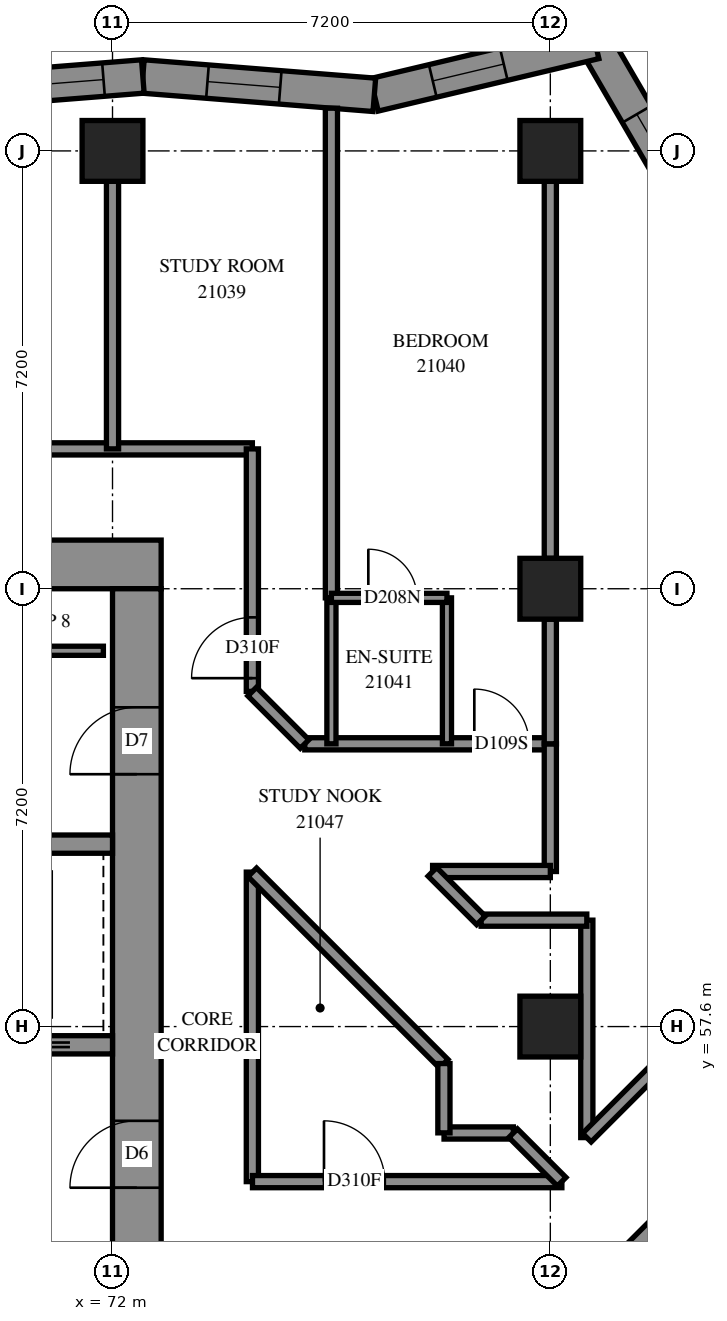
"""IFC4 building model, lengths in metres.
Left out: names, types, materials, properties, quantities, classifications, styles, units other than length and angle.
Written with IfcOpenShell. Run it as: python <this file> out.ifc"""

import sys

from ifc_helpers import new_model, si_unit, direction, frame, frame_2d, origin, origin_2d, place, context, subcontext, project, spatial, polyline, rectangle, outline, extrude, element, fill, save


model = new_model("IFC4")
c1 = context("Model", 3, precision=1e-05, world=origin(), true_north=direction((0.0, 1.0)))
c2 = subcontext(c1, "Body", "Model", "MODEL_VIEW")
j1 = project(units=[si_unit("LENGTHUNIT", "METRE"), si_unit("PLANEANGLEUNIT", "RADIAN")], contexts=[c1])
p1 = place(None, origin())
s1 = spatial("IfcSite", under=j1, at=p1, CompositionType="ELEMENT")
p2 = place(p1, origin())
s2 = spatial("IfcBuilding", under=s1, at=p2, CompositionType="ELEMENT")
p3 = place(p2, frame((0.0, 0.0, 81.2)))
s3 = spatial("IfcBuildingStorey", under=s2, at=p3, CompositionType="ELEMENT", Elevation=81.2)
for number, where, z_axis, x_axis in (
    (1, (72.0, 72.0, 0.0), (0.0, 0.0, 1.0), (1.0, 0.0, 0.0)),
    (2, (79.2, 57.6, 0.0), (0.0, 0.0, 1.0), (1.0, 0.0, 0.0)),
    (3, (79.2, 64.8, 0.0), (0.0, 0.0, 1.0), (1.0, 0.0, 0.0)),
    (4, (79.2, 72.0, 0.0), (0.0, 0.0, 1.0), (1.0, 0.0, 0.0)),
):
    element("IfcColumn", number, at=place(p3, frame(where, z_axis=z_axis, x_axis=x_axis)), inside=s3, PredefinedType="COLUMN", context=c2, shape_type="SweptSolid", body=[
        extrude(rectangle(XDim=1.0, YDim=1.0, at=origin_2d()), origin(), (0.0, 0.0, 1.0), 3.1),
    ])
p4 = place(p3, frame((56.8, 65.2, -0.3), z_axis=(0.0, 0.0, 1.0), x_axis=(1.0, 0.0, 0.0)))
e5 = element("IfcWall", 5, at=p4, inside=s3, PredefinedType="SHEAR", context=c2, shape_type="SweptSolid", body=[
    extrude(rectangle(XDim=16.0, YDim=0.8, at=frame_2d((8.0, 0.0))), origin(), (0.0, 0.0, 1.0), 2.7),
])
p5 = place(p4, frame((10.8, 0.0, 0.3)))
e6 = element("IfcOpeningElement", 6, at=p5, cuts=e5, PredefinedType="OPENING", context=c2, shape_type="SweptSolid", body=[
    extrude(rectangle(XDim=0.8, YDim=2.1, at=frame_2d((0.4, 1.05))), frame((0.0, 0.41, 0.0), z_axis=(0.0, -1.0, 0.0), x_axis=(1.0, 0.0, 0.0)), (0.0, 0.0, 1.0), 0.82),
])
p6 = place(p3, frame((72.4, 50.4, -0.3), z_axis=(0.0, 0.0, 1.0), x_axis=(0.0, 1.0, 0.0)))
e7 = element("IfcWall", 7, at=p6, inside=s3, PredefinedType="SHEAR", context=c2, shape_type="SweptSolid", body=[
    extrude(rectangle(XDim=14.4, YDim=0.8, at=frame_2d((7.2, 0.0))), origin(), (0.0, 0.0, 1.0), 2.7),
])
p7 = place(p6, frame((4.55, 0.0, 0.3)))
e8 = element("IfcOpeningElement", 8, at=p7, cuts=e7, PredefinedType="OPENING", context=c2, shape_type="SweptSolid", body=[
    extrude(rectangle(XDim=1.1, YDim=2.1, at=frame_2d((0.55, 1.05))), frame((0.0, 0.41, 0.0), z_axis=(0.0, -1.0, 0.0), x_axis=(1.0, 0.0, 0.0)), (0.0, 0.0, 1.0), 0.82),
])
p8 = place(p6, frame((11.35, 0.0, 0.3)))
e9 = element("IfcOpeningElement", 9, at=p8, cuts=e7, PredefinedType="OPENING", context=c2, shape_type="SweptSolid", body=[
    extrude(rectangle(XDim=1.1, YDim=2.1, at=frame_2d((0.55, 1.05))), frame((0.0, 0.41, 0.0), z_axis=(0.0, -1.0, 0.0), x_axis=(1.0, 0.0, 0.0)), (0.0, 0.0, 1.0), 0.82),
])
p9 = place(p3, frame((57.6, 57.3, 0.0), z_axis=(0.0, 0.0, 1.0), x_axis=(1.0, 0.0, 0.0)))
e10 = element("IfcWall", 10, at=p9, inside=s3, PredefinedType="SOLIDWALL", context=c2, shape_type="SweptSolid", body=[
    extrude(rectangle(XDim=14.4, YDim=0.3, at=frame_2d((7.2, 0.0))), origin(), (0.0, 0.0, 1.0), 3.1),
])
p10 = place(p9, frame((12.05, 0.0, 0.0)))
e11 = element("IfcOpeningElement", 11, at=p10, cuts=e10, PredefinedType="OPENING", context=c2, shape_type="SweptSolid", body=[
    extrude(rectangle(XDim=1.1, YDim=2.1, at=frame_2d((0.55, 1.05))), frame((0.0, 0.16, 0.0), z_axis=(0.0, -1.0, 0.0), x_axis=(1.0, 0.0, 0.0)), (0.0, 0.0, 1.0), 0.32),
])
p11 = place(p3, frame((64.8, 60.6, 0.0), z_axis=(0.0, 0.0, 1.0), x_axis=(1.0, 0.0, 0.0)))
e12 = element("IfcWall", 12, at=p11, inside=s3, PredefinedType="SOLIDWALL", context=c2, shape_type="SweptSolid", body=[
    extrude(rectangle(XDim=7.2, YDim=0.3, at=frame_2d((3.6, 0.0))), origin(), (0.0, 0.0, 1.0), 3.1),
])
p12 = place(p3, frame((76.372, 49.373, -0.3), z_axis=(0.0, 0.0, 1.0), x_axis=(0.7071067812, 0.7071067812, 0.0)))
e13 = element("IfcWall", 13, at=p12, inside=s3, PredefinedType="SHEAR", context=c2, shape_type="SweptSolid", body=[
    extrude(rectangle(XDim=14.4, YDim=0.8, at=frame_2d((7.2, 0.0))), origin(), (0.0, 0.0, 1.0), 2.7),
])
p13 = place(p12, frame((4.55, 0.0, 0.3)))
e14 = element("IfcOpeningElement", 14, at=p13, cuts=e13, PredefinedType="OPENING", context=c2, shape_type="SweptSolid", body=[
    extrude(rectangle(XDim=1.1, YDim=2.1, at=frame_2d((0.55, 1.05))), frame((0.0, 0.41, 0.0), z_axis=(0.0, -1.0, 0.0), x_axis=(1.0, 0.0, 0.0)), (0.0, 0.0, 1.0), 0.82),
])
p14 = place(p12, frame((11.35, 0.0, 0.3)))
e15 = element("IfcOpeningElement", 15, at=p14, cuts=e13, PredefinedType="OPENING", context=c2, shape_type="SweptSolid", body=[
    extrude(rectangle(XDim=1.1, YDim=2.1, at=frame_2d((0.55, 1.05))), frame((0.0, 0.41, 0.0), z_axis=(0.0, -1.0, 0.0), x_axis=(1.0, 0.0, 0.0)), (0.0, 0.0, 1.0), 0.82),
])
p15 = place(p3, frame((81.628, 70.876, 0.0), z_axis=(0.0, 0.0, 1.0), x_axis=(-0.5029323205, 0.8643257956, 0.0)))
e16 = element("IfcWall", 16, at=p15, inside=s3, PredefinedType="SOLIDWALL", context=c2, shape_type="SweptSolid", body=[
    extrude(outline(polyline([(0.048, -0.275), (3.57, -0.275), (3.162, 0.275), (-0.048, 0.275), (0.048, -0.275)])), origin(), (0.0, 0.0, 1.0), 3.1),
])
p16 = place(p15, frame((0.799, 0.0, 0.5)))
e17 = element("IfcOpeningElement", 17, at=p16, cuts=e16, PredefinedType="OPENING", context=c2, shape_type="SweptSolid", body=[
    extrude(rectangle(XDim=1.2, YDim=2.45, at=frame_2d((0.6, 1.225))), frame((0.0, 0.285, 0.0), z_axis=(0.0, -1.0, 0.0), x_axis=(1.0, 0.0, 0.0)), (0.0, 0.0, 1.0), 0.57),
])
p17 = place(p3, frame((79.935, 73.785, 0.0), z_axis=(0.0, 0.0, 1.0), x_axis=(-0.9728843946, -0.2312919254, 0.0)))
e18 = element("IfcWall", 18, at=p17, inside=s3, PredefinedType="SOLIDWALL", context=c2, shape_type="SweptSolid", body=[
    extrude(outline(polyline([(-0.204, -0.275), (3.687, -0.275), (3.774, 0.275), (0.204, 0.275), (-0.204, -0.275)])), origin(), (0.0, 0.0, 1.0), 3.1),
])
p18 = place(p17, frame((1.543, 0.0, 0.5)))
e19 = element("IfcOpeningElement", 19, at=p18, cuts=e18, PredefinedType="OPENING", context=c2, shape_type="SweptSolid", body=[
    extrude(rectangle(XDim=1.2, YDim=2.45, at=frame_2d((0.6, 1.225))), frame((0.0, 0.285, 0.0), z_axis=(0.0, -1.0, 0.0), x_axis=(1.0, 0.0, 0.0)), (0.0, 0.0, 1.0), 0.57),
])
p19 = place(p3, frame((76.306, 72.922, 0.0), z_axis=(0.0, 0.0, 1.0), x_axis=(-0.9968745318, 0.0790010628, 0.0)))
e20 = element("IfcWall", 20, at=p19, inside=s3, PredefinedType="SOLIDWALL", context=c2, shape_type="SweptSolid", body=[
    extrude(outline(polyline([(0.043, -0.275), (3.841, -0.275), (3.797, 0.275), (-0.043, 0.275), (0.043, -0.275)])), origin(), (0.0, 0.0, 1.0), 3.1),
])
p20 = place(p19, frame((1.553, 0.0, 0.5)))
e21 = element("IfcOpeningElement", 21, at=p20, cuts=e20, PredefinedType="OPENING", context=c2, shape_type="SweptSolid", body=[
    extrude(rectangle(XDim=1.2, YDim=2.45, at=frame_2d((0.6, 1.225))), frame((0.0, 0.285, 0.0), z_axis=(0.0, -1.0, 0.0), x_axis=(1.0, 0.0, 0.0)), (0.0, 0.0, 1.0), 0.57),
])
p21 = place(p3, frame((72.499, 73.224, 0.0), z_axis=(0.0, 0.0, 1.0), x_axis=(-0.9968747806, -0.0789979222, 0.0)))
e22 = element("IfcWall", 22, at=p21, inside=s3, PredefinedType="SOLIDWALL", context=c2, shape_type="SweptSolid", body=[
    extrude(outline(polyline([(-0.022, -0.275), (3.776, -0.275), (3.819, 0.275), (0.022, 0.275), (-0.022, -0.275)])), origin(), (0.0, 0.0, 1.0), 3.1),
])
p22 = place(p21, frame((0.649, 0.0, 0.5)))
e23 = element("IfcOpeningElement", 23, at=p22, cuts=e22, PredefinedType="OPENING", context=c2, shape_type="SweptSolid", body=[
    extrude(rectangle(XDim=1.3, YDim=2.45, at=frame_2d((0.65, 1.225))), frame((0.0, 0.285, 0.0), z_axis=(0.0, -1.0, 0.0), x_axis=(1.0, 0.0, 0.0)), (0.0, 0.0, 1.0), 0.57),
])
p23 = place(p21, frame((2.149, 0.0, 0.5)))
e24 = element("IfcOpeningElement", 24, at=p23, cuts=e22, PredefinedType="OPENING", context=c2, shape_type="SweptSolid", body=[
    extrude(rectangle(XDim=1.3, YDim=2.45, at=frame_2d((0.65, 1.225))), frame((0.0, 0.285, 0.0), z_axis=(0.0, -1.0, 0.0), x_axis=(1.0, 0.0, 0.0)), (0.0, 0.0, 1.0), 0.57),
])
p24 = place(p3, frame((64.95, 63.78, 0.0), z_axis=(0.0, 0.0, 1.0), x_axis=(1.0, 0.0, 0.0)))
e25 = element("IfcWall", 25, at=p24, inside=s3, PredefinedType="PARTITIONING", context=c2, shape_type="SweptSolid", body=[
    extrude(rectangle(XDim=6.9, YDim=0.15, at=frame_2d((3.45, 0.0))), origin(), (0.0, 0.0, 1.0), 3.1),
])
p25 = place(p3, frame((55.3, 67.1, 0.0), z_axis=(0.0, 0.0, 1.0), x_axis=(1.0, 0.0, 0.0)))
e26 = element("IfcWall", 26, at=p25, inside=s3, PredefinedType="PARTITIONING", context=c2, shape_type="SweptSolid", body=[
    extrude(rectangle(XDim=19.0, YDim=0.2, at=frame_2d((9.5, 0.0))), origin(), (0.0, 0.0, 1.0), 3.1),
])
p26 = place(p25, frame((6.161, 0.0, 0.0)))
e27 = element("IfcOpeningElement", 27, at=p26, cuts=e26, PredefinedType="OPENING", context=c2, shape_type="SweptSolid", body=[
    extrude(rectangle(XDim=0.9, YDim=2.1, at=frame_2d((0.45, 1.05))), frame((0.0, 0.11, 0.0), z_axis=(0.0, -1.0, 0.0), x_axis=(1.0, 0.0, 0.0)), (0.0, 0.0, 1.0), 0.22),
])
p27 = place(p25, frame((13.386, 0.0, 0.0)))
e28 = element("IfcOpeningElement", 28, at=p27, cuts=e26, PredefinedType="OPENING", context=c2, shape_type="SweptSolid", body=[
    extrude(rectangle(XDim=1.0, YDim=2.1, at=frame_2d((0.5, 1.05))), frame((0.0, 0.11, 0.0), z_axis=(0.0, -1.0, 0.0), x_axis=(1.0, 0.0, 0.0)), (0.0, 0.0, 1.0), 0.22),
])
p28 = place(p3, frame((75.6, 64.65, 0.0), z_axis=(0.0, 0.0, 1.0), x_axis=(0.0, 1.0, 0.0)))
e29 = element("IfcWall", 29, at=p28, inside=s3, PredefinedType="PARTITIONING", context=c2, shape_type="SweptSolid", body=[
    extrude(rectangle(XDim=8.053, YDim=0.2, at=frame_2d((4.026, 0.0))), origin(), (0.0, 0.0, 1.0), 3.1),
])
p29 = place(p3, frame((79.2, 65.3, 0.0), z_axis=(0.0, 0.0, 1.0), x_axis=(0.0, 1.0, 0.0)))
e30 = element("IfcWall", 30, at=p29, inside=s3, PredefinedType="PARTITIONING", context=c2, shape_type="SweptSolid", body=[
    extrude(rectangle(XDim=6.2, YDim=0.2, at=frame_2d((3.1, 0.0))), origin(), (0.0, 0.0, 1.0), 3.1),
])
p30 = place(p3, frame((74.3, 55.05, 0.0), z_axis=(0.0, 0.0, 1.0), x_axis=(0.0, 1.0, 0.0)))
e31 = element("IfcWall", 31, at=p30, inside=s3, PredefinedType="PARTITIONING", context=c2, shape_type="SweptSolid", body=[
    extrude(rectangle(XDim=5.09, YDim=0.2, at=frame_2d((2.545, 0.0))), origin(), (0.0, 0.0, 1.0), 3.1),
])
p31 = place(p3, frame((74.302, 55.05, 0.0), z_axis=(0.0, 0.0, 1.0), x_axis=(1.0, 0.0, 0.0)))
e32 = element("IfcWall", 32, at=p31, inside=s3, PredefinedType="PARTITIONING", context=c2, shape_type="SweptSolid", body=[
    extrude(rectangle(XDim=5.088, YDim=0.2, at=frame_2d((2.544, 0.0))), origin(), (0.0, 0.0, 1.0), 3.1),
])
p32 = place(p31, frame((1.176, 0.0, 0.0)))
e33 = element("IfcOpeningElement", 33, at=p32, cuts=e32, PredefinedType="OPENING", context=c2, shape_type="SweptSolid", body=[
    extrude(rectangle(XDim=1.0, YDim=2.1, at=frame_2d((0.5, 1.05))), frame((0.0, 0.11, 0.0), z_axis=(0.0, -1.0, 0.0), x_axis=(1.0, 0.0, 0.0)), (0.0, 0.0, 1.0), 0.22),
])
p33 = place(p3, frame((74.299, 60.137, 0.0), z_axis=(0.0, 0.0, 1.0), x_axis=(0.7071067812, -0.7071067812, 0.0)))
e34 = element("IfcWall", 34, at=p33, inside=s3, PredefinedType="PARTITIONING", context=c2, shape_type="SweptSolid", body=[
    extrude(rectangle(XDim=4.452, YDim=0.2, at=frame_2d((2.226, 0.0))), origin(), (0.0, 0.0, 1.0), 3.1),
])
p34 = place(p3, frame((72.0, 67.1, 0.0), z_axis=(0.0, 0.0, 1.0), x_axis=(0.0, 1.0, 0.0)))
e35 = element("IfcWall", 35, at=p34, inside=s3, PredefinedType="PARTITIONING", context=c2, shape_type="SweptSolid", body=[
    extrude(rectangle(XDim=4.4, YDim=0.2, at=frame_2d((2.2, 0.0))), origin(), (0.0, 0.0, 1.0), 3.1),
])
p35 = place(p3, frame((75.162, 62.25, 0.0), z_axis=(0.0, 0.0, 1.0), x_axis=(1.0, 0.0, 0.0)))
e36 = element("IfcWall", 36, at=p35, inside=s3, PredefinedType="PARTITIONING", context=c2, shape_type="SweptSolid", body=[
    extrude(rectangle(XDim=4.038, YDim=0.2, at=frame_2d((2.019, 0.0))), origin(), (0.0, 0.0, 1.0), 3.1),
])
p36 = place(p35, frame((2.788, 0.0, 0.0)))
e37 = element("IfcOpeningElement", 37, at=p36, cuts=e36, PredefinedType="OPENING", context=c2, shape_type="SweptSolid", body=[
    extrude(rectangle(XDim=0.9, YDim=2.1, at=frame_2d((0.45, 1.05))), frame((0.0, 0.11, 0.0), z_axis=(0.0, -1.0, 0.0), x_axis=(1.0, 0.0, 0.0)), (0.0, 0.0, 1.0), 0.22),
])
p37 = place(p3, frame((74.3, 63.112, 0.0), z_axis=(0.0, 0.0, 1.0), x_axis=(0.0, 1.0, 0.0)))
e38 = element("IfcWall", 38, at=p37, inside=s3, PredefinedType="PARTITIONING", context=c2, shape_type="SweptSolid", body=[
    extrude(rectangle(XDim=3.988, YDim=0.2, at=frame_2d((1.994, 0.0))), origin(), (0.0, 0.0, 1.0), 3.1),
])
p38 = place(p37, frame((0.217, 0.0, 0.0)))
e39 = element("IfcOpeningElement", 39, at=p38, cuts=e38, PredefinedType="OPENING", context=c2, shape_type="SweptSolid", body=[
    extrude(rectangle(XDim=1.0, YDim=2.1, at=frame_2d((0.5, 1.05))), frame((0.0, 0.11, 0.0), z_axis=(0.0, -1.0, 0.0), x_axis=(1.0, 0.0, 0.0)), (0.0, 0.0, 1.0), 0.22),
])
p39 = place(p3, frame((79.8, 55.774, 0.0), z_axis=(0.0, 0.0, 1.0), x_axis=(0.0, 1.0, 0.0)))
e40 = element("IfcWall", 40, at=p39, inside=s3, PredefinedType="PARTITIONING", context=c2, shape_type="SweptSolid", body=[
    extrude(rectangle(XDim=3.576, YDim=0.2, at=frame_2d((1.788, 0.0))), origin(), (0.0, 0.0, 1.0), 3.1),
])
for number, where, z_axis, x_axis in (
    (41, (75.6, 62.25, 0.0), (0.0, 0.0, 1.0), (0.0, 1.0, 0.0)),
    (42, (77.5, 62.25, 0.0), (0.0, 0.0, 1.0), (0.0, 1.0, 0.0)),
):
    element("IfcWall", number, at=place(p3, frame(where, z_axis=z_axis, x_axis=x_axis)), inside=s3, PredefinedType="PARTITIONING", context=c2, shape_type="SweptSolid", body=[
        extrude(rectangle(XDim=2.4, YDim=0.15, at=frame_2d((1.2, 0.0))), origin(), (0.0, 0.0, 1.0), 3.1),
    ])
p40 = place(p3, frame((79.2, 60.15, 0.0), z_axis=(0.0, 0.0, 1.0), x_axis=(0.0, 1.0, 0.0)))
e43 = element("IfcWall", 43, at=p40, inside=s3, PredefinedType="PARTITIONING", context=c2, shape_type="SweptSolid", body=[
    extrude(rectangle(XDim=2.1, YDim=0.2, at=frame_2d((1.05, 0.0))), origin(), (0.0, 0.0, 1.0), 3.1),
])
p41 = place(p3, frame((79.2, 62.25, 0.0), z_axis=(0.0, 0.0, 1.0), x_axis=(0.0, 1.0, 0.0)))
e44 = element("IfcWall", 44, at=p41, inside=s3, PredefinedType="PARTITIONING", context=c2, shape_type="SweptSolid", body=[
    extrude(rectangle(XDim=2.05, YDim=0.2, at=frame_2d((1.025, 0.0))), origin(), (0.0, 0.0, 1.0), 3.1),
])
p42 = place(p3, frame((77.264, 60.15, 0.0), z_axis=(0.0, 0.0, 1.0), x_axis=(1.0, 0.0, 0.0)))
e45 = element("IfcWall", 45, at=p42, inside=s3, PredefinedType="PARTITIONING", context=c2, shape_type="SweptSolid", body=[
    extrude(rectangle(XDim=1.936, YDim=0.2, at=frame_2d((0.968, 0.0))), origin(), (0.0, 0.0, 1.0), 3.1),
])
p43 = place(p3, frame((75.6, 64.65, 0.0), z_axis=(0.0, 0.0, 1.0), x_axis=(1.0, 0.0, 0.0)))
e46 = element("IfcWall", 46, at=p43, inside=s3, PredefinedType="PARTITIONING", context=c2, shape_type="SweptSolid", body=[
    extrude(rectangle(XDim=1.9, YDim=0.15, at=frame_2d((0.95, 0.0))), origin(), (0.0, 0.0, 1.0), 3.1),
])
p44 = place(p43, frame((0.607, 0.0, 0.0)))
e47 = element("IfcOpeningElement", 47, at=p44, cuts=e46, PredefinedType="OPENING", context=c2, shape_type="SweptSolid", body=[
    extrude(rectangle(XDim=0.8, YDim=2.1, at=frame_2d((0.4, 1.05))), frame((0.0, 0.085, 0.0), z_axis=(0.0, -1.0, 0.0), x_axis=(1.0, 0.0, 0.0)), (0.0, 0.0, 1.0), 0.17),
])
p45 = place(p3, frame((78.062, 59.35, 0.0), z_axis=(0.0, 0.0, 1.0), x_axis=(1.0, 0.0, 0.0)))
e48 = element("IfcWall", 48, at=p45, inside=s3, PredefinedType="PARTITIONING", context=c2, shape_type="SweptSolid", body=[
    extrude(rectangle(XDim=1.738, YDim=0.2, at=frame_2d((0.869, 0.0))), origin(), (0.0, 0.0, 1.0), 3.1),
])
p46 = place(p3, frame((79.801, 55.773, 0.0), z_axis=(0.0, 0.0, 1.0), x_axis=(0.7071067812, 0.7071067812, 0.0)))
e49 = element("IfcWall", 49, at=p46, inside=s3, PredefinedType="PARTITIONING", context=c2, shape_type="SweptSolid", body=[
    extrude(rectangle(XDim=1.623, YDim=0.2, at=frame_2d((0.812, 0.0))), origin(), (0.0, 0.0, 1.0), 3.1),
])
p47 = place(p3, frame((74.296, 63.108, 0.0), z_axis=(0.0, 0.0, 1.0), x_axis=(0.7071067812, -0.7071067812, 0.0)))
e50 = element("IfcWall", 50, at=p47, inside=s3, PredefinedType="PARTITIONING", context=c2, shape_type="SweptSolid", body=[
    extrude(rectangle(XDim=1.219, YDim=0.2, at=frame_2d((0.61, 0.0))), origin(), (0.0, 0.0, 1.0), 3.1),
])
for number, where, z_axis, x_axis in (
    (51, (77.452, 55.85, 0.0), (0.0, 0.0, 1.0), (1.0, 0.0, 0.0)),
    (52, (77.45, 55.852, 0.0), (0.0, 0.0, 1.0), (0.0, 1.0, 0.0)),
):
    element("IfcWall", number, at=place(p3, frame(where, z_axis=z_axis, x_axis=x_axis)), inside=s3, PredefinedType="PARTITIONING", context=c2, shape_type="SweptSolid", body=[
        extrude(rectangle(XDim=1.14, YDim=0.2, at=frame_2d((0.57, 0.0))), origin(), (0.0, 0.0, 1.0), 3.1),
    ])
for number, where, z_axis, x_axis in (
    (53, (77.26, 60.145, 0.0), (0.0, 0.0, 1.0), (0.707, -0.707, 0.0)),
    (54, (78.589, 55.847, 0.0), (0.0, 0.0, 1.0), (0.707, -0.707, 0.0)),
):
    element("IfcWall", number, at=place(p3, frame(where, z_axis=z_axis, x_axis=x_axis)), inside=s3, PredefinedType="PARTITIONING", context=c2, shape_type="SweptSolid", body=[
        extrude(rectangle(XDim=1.129, YDim=0.2, at=frame_2d((0.564, 0.0))), origin(), (0.0, 0.0, 1.0), 3.1),
    ])
p48 = place(p16, origin())
e55 = element("IfcWindow", 55, at=p48, inside=s3, PartitioningType="SINGLE_PANEL", PredefinedType="WINDOW", context=c2, shape_type="SweptSolid", body=[
    extrude(rectangle(XDim=1.2, YDim=2.45, at=frame_2d((0.6, 1.225))), frame((0.0, 0.155, 0.0), z_axis=(0.0, -1.0, 0.0), x_axis=(1.0, 0.0, 0.0)), (0.0, 0.0, 1.0), 0.06),
])
fill(e17, e55)
p49 = place(p18, origin())
e56 = element("IfcWindow", 56, at=p49, inside=s3, PartitioningType="SINGLE_PANEL", PredefinedType="WINDOW", context=c2, shape_type="SweptSolid", body=[
    extrude(rectangle(XDim=1.2, YDim=2.45, at=frame_2d((0.6, 1.225))), frame((0.0, 0.155, 0.0), z_axis=(0.0, -1.0, 0.0), x_axis=(1.0, 0.0, 0.0)), (0.0, 0.0, 1.0), 0.06),
])
fill(e19, e56)
p50 = place(p20, origin())
e57 = element("IfcWindow", 57, at=p50, inside=s3, PartitioningType="SINGLE_PANEL", PredefinedType="WINDOW", context=c2, shape_type="SweptSolid", body=[
    extrude(rectangle(XDim=1.2, YDim=2.45, at=frame_2d((0.6, 1.225))), frame((0.0, 0.155, 0.0), z_axis=(0.0, -1.0, 0.0), x_axis=(1.0, 0.0, 0.0)), (0.0, 0.0, 1.0), 0.06),
])
fill(e21, e57)
p51 = place(p22, origin())
e58 = element("IfcWindow", 58, at=p51, inside=s3, PartitioningType="SINGLE_PANEL", PredefinedType="WINDOW", context=c2, shape_type="SweptSolid", body=[
    extrude(rectangle(XDim=1.3, YDim=2.45, at=frame_2d((0.65, 1.225))), frame((0.0, 0.155, 0.0), z_axis=(0.0, -1.0, 0.0), x_axis=(1.0, 0.0, 0.0)), (0.0, 0.0, 1.0), 0.06),
])
fill(e23, e58)
p52 = place(p7, origin())
e59 = element("IfcDoor", 59, at=p52, inside=s3, OperationType="DOUBLE_DOOR_SINGLE_SWING", PredefinedType="DOOR", context=c2, shape_type="SweptSolid", body=[
    extrude(rectangle(XDim=1.1, YDim=2.1, at=frame_2d((0.55, 1.05))), frame((0.0, 0.025, 0.0), z_axis=(0.0, -1.0, 0.0), x_axis=(1.0, 0.0, 0.0)), (0.0, 0.0, 1.0), 0.05),
])
fill(e8, e59)
p53 = place(p8, origin())
e60 = element("IfcDoor", 60, at=p53, inside=s3, OperationType="SINGLE_SWING_RIGHT", PredefinedType="DOOR", context=c2, shape_type="SweptSolid", body=[
    extrude(rectangle(XDim=1.1, YDim=2.1, at=frame_2d((0.55, 1.05))), frame((0.0, 0.025, 0.0), z_axis=(0.0, -1.0, 0.0), x_axis=(1.0, 0.0, 0.0)), (0.0, 0.0, 1.0), 0.05),
])
fill(e9, e60)
p54 = place(p38, origin())
e61 = element("IfcDoor", 61, at=p54, inside=s3, OperationType="SINGLE_SWING_RIGHT", PredefinedType="DOOR", context=c2, shape_type="SweptSolid", body=[
    extrude(rectangle(XDim=1.0, YDim=2.1, at=frame_2d((0.5, 1.05))), frame((0.0, 0.025, 0.0), z_axis=(0.0, -1.0, 0.0), x_axis=(1.0, 0.0, 0.0)), (0.0, 0.0, 1.0), 0.05),
])
fill(e39, e61)
p55 = place(p36, origin())
e62 = element("IfcDoor", 62, at=p55, inside=s3, OperationType="SINGLE_SWING_LEFT", PredefinedType="DOOR", context=c2, shape_type="SweptSolid", body=[
    extrude(rectangle(XDim=0.9, YDim=2.1, at=frame_2d((0.45, 1.05))), frame((0.0, 0.025, 0.0), z_axis=(0.0, -1.0, 0.0), x_axis=(1.0, 0.0, 0.0)), (0.0, 0.0, 1.0), 0.05),
])
fill(e37, e62)
p56 = place(p44, origin())
e63 = element("IfcDoor", 63, at=p56, inside=s3, OperationType="SINGLE_SWING_RIGHT", PredefinedType="DOOR", context=c2, shape_type="SweptSolid", body=[
    extrude(rectangle(XDim=0.8, YDim=2.1, at=frame_2d((0.4, 1.05))), frame((0.0, 0.025, 0.0), z_axis=(0.0, -1.0, 0.0), x_axis=(1.0, 0.0, 0.0)), (0.0, 0.0, 1.0), 0.05),
])
fill(e47, e63)
p57 = place(p32, origin())
e64 = element("IfcDoor", 64, at=p57, inside=s3, OperationType="SINGLE_SWING_LEFT", PredefinedType="DOOR", context=c2, shape_type="SweptSolid", body=[
    extrude(rectangle(XDim=1.0, YDim=2.1, at=frame_2d((0.5, 1.05))), frame((0.0, 0.025, 0.0), z_axis=(0.0, -1.0, 0.0), x_axis=(1.0, 0.0, 0.0)), (0.0, 0.0, 1.0), 0.05),
])
fill(e33, e64)
save(model, sys.argv[1])
